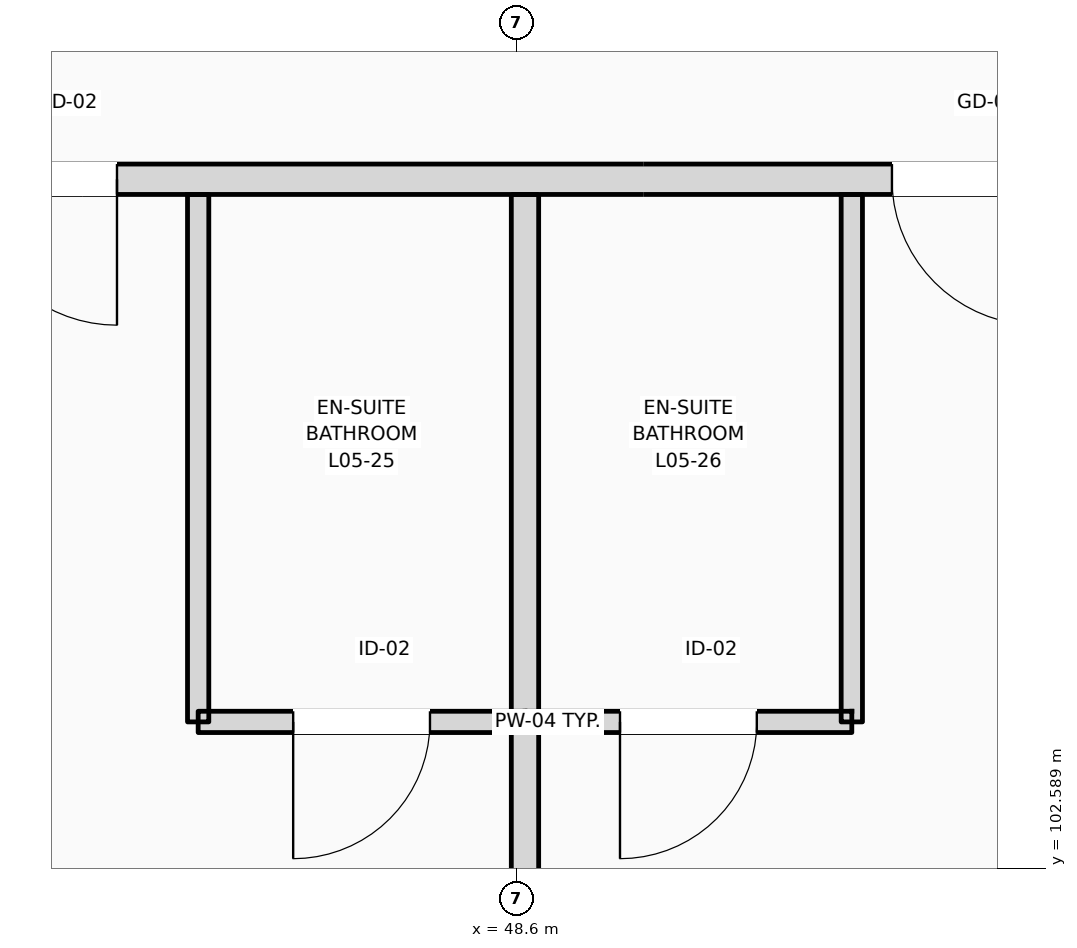
"""IFC4 building model, lengths in metres.
Left out: names, types, materials, properties, quantities, classifications, styles, units other than length and angle.
Written with IfcOpenShell. Run it as: python <this file> out.ifc"""

import sys

from ifc_helpers import new_model, si_unit, direction, frame, frame_2d, origin, place, context, subcontext, project, spatial, rectangle, extrude, element, fill, save


model = new_model("IFC4")
c1 = context("Model", 3, precision=1e-05, world=origin(), true_north=direction((0.0, 1.0)))
c2 = subcontext(c1, "Body", "Model", "MODEL_VIEW")
j1 = project(units=[si_unit("LENGTHUNIT", "METRE"), si_unit("PLANEANGLEUNIT", "RADIAN")], contexts=[c1])
p1 = place(None, origin())
s1 = spatial("IfcSite", under=j1, at=p1, CompositionType="ELEMENT")
p2 = place(p1, origin())
s2 = spatial("IfcBuilding", under=s1, at=p2, CompositionType="ELEMENT")
p3 = place(p2, frame((0.0, 0.0, 24.6)))
s3 = spatial("IfcBuildingStorey", under=s2, at=p3, CompositionType="ELEMENT", Elevation=24.6)
p4 = place(p3, frame((40.76, 107.12, 0.0), z_axis=(0.0, 0.0, 1.0), x_axis=(1.0, 0.0, 0.0)))
e1 = element("IfcWall", 1, at=p4, inside=s3, PredefinedType="PARTITIONING", context=c2, shape_type="SweptSolid", body=[
    extrude(rectangle(XDim=23.44, YDim=0.2, at=frame_2d((11.72, 0.0))), origin(), (0.0, 0.0, 1.0), 3.34),
])
p5 = place(p4, frame((2.449, 0.0, 0.0)))
e2 = element("IfcOpeningElement", 2, at=p5, cuts=e1, PredefinedType="OPENING", context=c2, shape_type="SweptSolid", body=[
    extrude(rectangle(XDim=0.96, YDim=2.2, at=frame_2d((0.48, 1.1))), frame((0.0, 0.11, 0.0), z_axis=(0.0, -1.0, 0.0), x_axis=(1.0, 0.0, 0.0)), (0.0, 0.0, 1.0), 0.22),
])
p6 = place(p4, frame((4.253, 0.0, 0.0)))
e3 = element("IfcOpeningElement", 3, at=p6, cuts=e1, PredefinedType="OPENING", context=c2, shape_type="SweptSolid", body=[
    extrude(rectangle(XDim=0.96, YDim=2.2, at=frame_2d((0.48, 1.1))), frame((0.0, 0.11, 0.0), z_axis=(0.0, -1.0, 0.0), x_axis=(1.0, 0.0, 0.0)), (0.0, 0.0, 1.0), 0.22),
])
p7 = place(p4, frame((10.311, 0.0, 0.0)))
e4 = element("IfcOpeningElement", 4, at=p7, cuts=e1, PredefinedType="OPENING", context=c2, shape_type="SweptSolid", body=[
    extrude(rectangle(XDim=0.96, YDim=2.2, at=frame_2d((0.48, 1.1))), frame((0.0, 0.11, 0.0), z_axis=(0.0, -1.0, 0.0), x_axis=(1.0, 0.0, 0.0)), (0.0, 0.0, 1.0), 0.22),
])
p8 = place(p4, frame((12.069, 0.0, 0.0)))
e5 = element("IfcOpeningElement", 5, at=p8, cuts=e1, PredefinedType="OPENING", context=c2, shape_type="SweptSolid", body=[
    extrude(rectangle(XDim=0.96, YDim=2.2, at=frame_2d((0.48, 1.1))), frame((0.0, 0.11, 0.0), z_axis=(0.0, -1.0, 0.0), x_axis=(1.0, 0.0, 0.0)), (0.0, 0.0, 1.0), 0.22),
])
p9 = place(p4, frame((18.128, 0.0, 0.0)))
e6 = element("IfcOpeningElement", 6, at=p9, cuts=e1, PredefinedType="OPENING", context=c2, shape_type="SweptSolid", body=[
    extrude(rectangle(XDim=0.96, YDim=2.2, at=frame_2d((0.48, 1.1))), frame((0.0, 0.11, 0.0), z_axis=(0.0, -1.0, 0.0), x_axis=(1.0, 0.0, 0.0)), (0.0, 0.0, 1.0), 0.22),
])
p10 = place(p4, frame((19.841, 0.0, 0.0)))
e7 = element("IfcOpeningElement", 7, at=p10, cuts=e1, PredefinedType="OPENING", context=c2, shape_type="SweptSolid", body=[
    extrude(rectangle(XDim=0.96, YDim=2.2, at=frame_2d((0.48, 1.1))), frame((0.0, 0.11, 0.0), z_axis=(0.0, -1.0, 0.0), x_axis=(1.0, 0.0, 0.0)), (0.0, 0.0, 1.0), 0.22),
])
p11 = place(p3, frame((48.657, 96.14, 0.0), z_axis=(0.0, 0.0, 1.0), x_axis=(0.0, 1.0, 0.0)))
e8 = element("IfcWall", 8, at=p11, inside=s3, PredefinedType="PARTITIONING", context=c2, shape_type="SweptSolid", body=[
    extrude(rectangle(XDim=10.88, YDim=0.18, at=frame_2d((5.44, 0.0))), origin(), (0.0, 0.0, 1.0), 2.93),
])
p12 = place(p3, frame((46.507, 103.55, 0.0), z_axis=(0.0, 0.0, 1.0), x_axis=(0.0, 1.0, 0.0)))
e9 = element("IfcWall", 9, at=p12, inside=s3, PredefinedType="PARTITIONING", context=c2, shape_type="SweptSolid", body=[
    extrude(rectangle(XDim=3.47, YDim=0.14, at=frame_2d((1.735, 0.0))), origin(), (0.0, 0.0, 1.0), 3.34),
])
p13 = place(p3, frame((46.507, 103.55, 0.0), z_axis=(0.0, 0.0, 1.0), x_axis=(1.0, 0.0, 0.0)))
e10 = element("IfcWall", 10, at=p13, inside=s3, PredefinedType="PARTITIONING", context=c2, shape_type="SweptSolid", body=[
    extrude(rectangle(XDim=2.15, YDim=0.14, at=frame_2d((1.075, 0.0))), origin(), (0.0, 0.0, 1.0), 3.34),
])
p14 = place(p13, frame((0.625, 0.0, 0.0)))
e11 = element("IfcOpeningElement", 11, at=p14, cuts=e10, PredefinedType="OPENING", context=c2, shape_type="SweptSolid", body=[
    extrude(rectangle(XDim=0.9, YDim=2.1, at=frame_2d((0.45, 1.05))), frame((0.0, 0.08, 0.0), z_axis=(0.0, -1.0, 0.0), x_axis=(1.0, 0.0, 0.0)), (0.0, 0.0, 1.0), 0.16),
])
p15 = place(p3, frame((50.807, 103.55, 0.0), z_axis=(0.0, 0.0, 1.0), x_axis=(0.0, 1.0, 0.0)))
e12 = element("IfcWall", 12, at=p15, inside=s3, PredefinedType="PARTITIONING", context=c2, shape_type="SweptSolid", body=[
    extrude(rectangle(XDim=3.47, YDim=0.14, at=frame_2d((1.735, 0.0))), origin(), (0.0, 0.0, 1.0), 3.34),
])
p16 = place(p3, frame((48.657, 103.55, 0.0), z_axis=(0.0, 0.0, 1.0), x_axis=(1.0, 0.0, 0.0)))
e13 = element("IfcWall", 13, at=p16, inside=s3, PredefinedType="PARTITIONING", context=c2, shape_type="SweptSolid", body=[
    extrude(rectangle(XDim=2.15, YDim=0.14, at=frame_2d((1.075, 0.0))), origin(), (0.0, 0.0, 1.0), 3.34),
])
p17 = place(p16, frame((0.625, 0.0, 0.0)))
e14 = element("IfcOpeningElement", 14, at=p17, cuts=e13, PredefinedType="OPENING", context=c2, shape_type="SweptSolid", body=[
    extrude(rectangle(XDim=0.9, YDim=2.1, at=frame_2d((0.45, 1.05))), frame((0.0, 0.08, 0.0), z_axis=(0.0, -1.0, 0.0), x_axis=(1.0, 0.0, 0.0)), (0.0, 0.0, 1.0), 0.16),
])
p18 = place(p6, frame((0.96, 0.0, 0.0), z_axis=(0.0, 0.0, 1.0), x_axis=(-1.0, 0.0, 0.0)))
e15 = element("IfcDoor", 15, at=p18, inside=s3, OperationType="SINGLE_SWING_RIGHT", PredefinedType="DOOR", context=c2, shape_type="SweptSolid", body=[
    extrude(rectangle(XDim=0.96, YDim=2.2, at=frame_2d((0.48, 1.1))), frame((0.0, 0.025, 0.0), z_axis=(0.0, -1.0, 0.0), x_axis=(1.0, 0.0, 0.0)), (0.0, 0.0, 1.0), 0.05),
])
fill(e3, e15)
p19 = place(p14, frame((0.9, 0.0, 0.0), z_axis=(0.0, 0.0, 1.0), x_axis=(-1.0, 0.0, 0.0)))
e16 = element("IfcDoor", 16, at=p19, inside=s3, OperationType="SINGLE_SWING_LEFT", PredefinedType="DOOR", context=c2, shape_type="SweptSolid", body=[
    extrude(rectangle(XDim=0.9, YDim=2.1, at=frame_2d((0.45, 1.05))), frame((0.0, 0.025, 0.0), z_axis=(0.0, -1.0, 0.0), x_axis=(1.0, 0.0, 0.0)), (0.0, 0.0, 1.0), 0.05),
])
fill(e11, e16)
p20 = place(p7, frame((0.96, 0.0, 0.0), z_axis=(0.0, 0.0, 1.0), x_axis=(-1.0, 0.0, 0.0)))
e17 = element("IfcDoor", 17, at=p20, inside=s3, OperationType="SINGLE_SWING_RIGHT", PredefinedType="DOOR", context=c2, shape_type="SweptSolid", body=[
    extrude(rectangle(XDim=0.96, YDim=2.2, at=frame_2d((0.48, 1.1))), frame((0.0, 0.025, 0.0), z_axis=(0.0, -1.0, 0.0), x_axis=(1.0, 0.0, 0.0)), (0.0, 0.0, 1.0), 0.05),
])
fill(e4, e17)
p21 = place(p17, frame((0.9, 0.0, 0.0), z_axis=(0.0, 0.0, 1.0), x_axis=(-1.0, 0.0, 0.0)))
e18 = element("IfcDoor", 18, at=p21, inside=s3, OperationType="SINGLE_SWING_LEFT", PredefinedType="DOOR", context=c2, shape_type="SweptSolid", body=[
    extrude(rectangle(XDim=0.9, YDim=2.1, at=frame_2d((0.45, 1.05))), frame((0.0, 0.025, 0.0), z_axis=(0.0, -1.0, 0.0), x_axis=(1.0, 0.0, 0.0)), (0.0, 0.0, 1.0), 0.05),
])
fill(e14, e18)
save(model, sys.argv[1])
